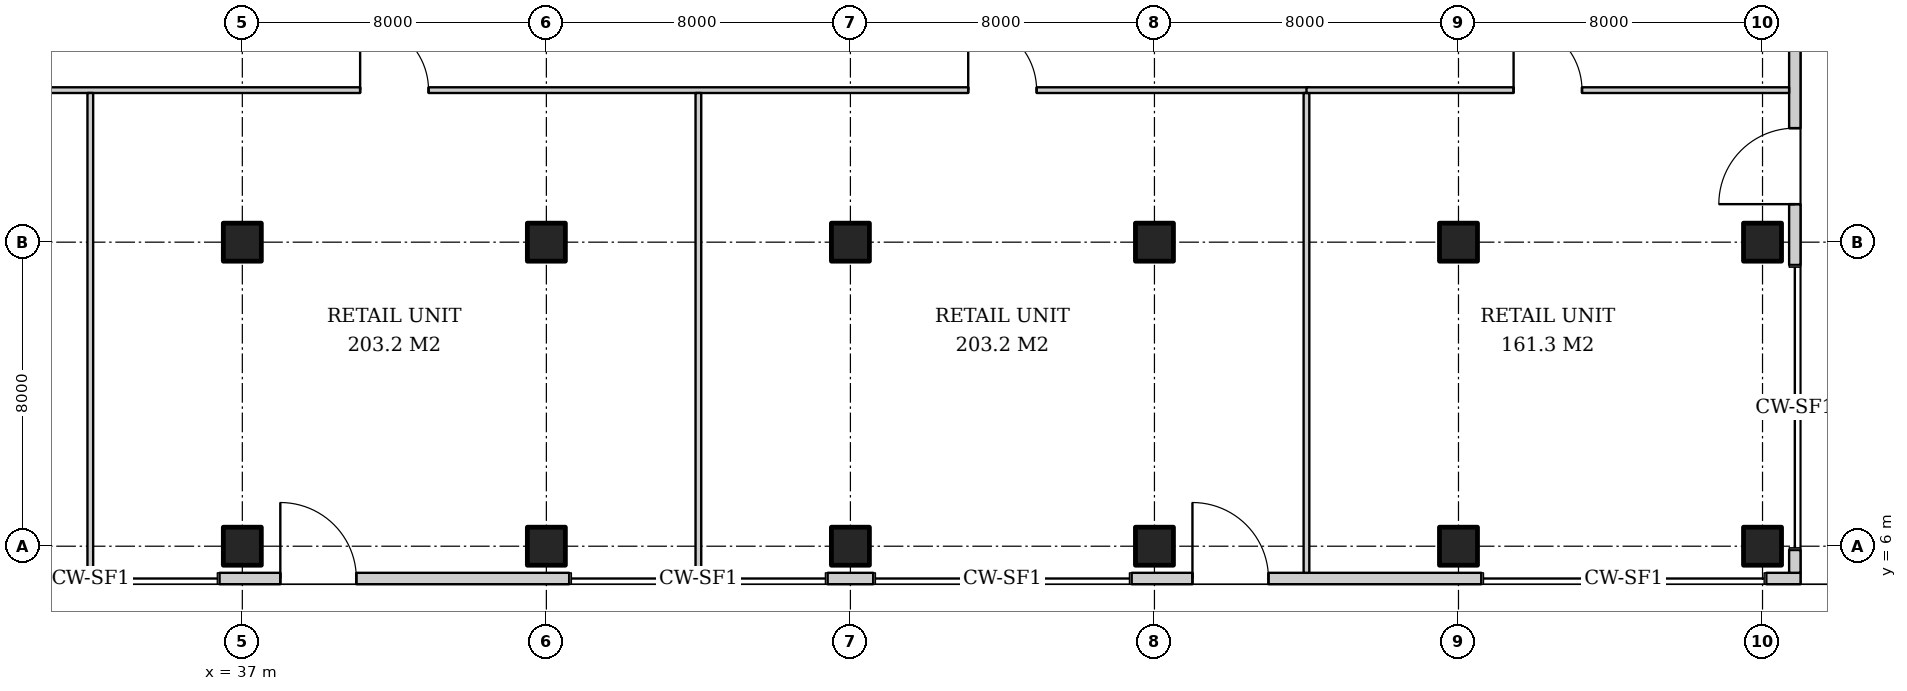
"""IFC4 building model, lengths in metres.
Left out: names, types, materials, properties, quantities, classifications, styles, units other than length and angle.
Written with IfcOpenShell. Run it as: python <this file> out.ifc"""

import sys

from ifc_helpers import new_model, si_unit, direction, frame, frame_2d, origin, origin_2d, place, context, subcontext, project, spatial, rectangle, extrude, element, fill, save


model = new_model("IFC4")
c1 = context("Model", 3, precision=1e-05, world=origin(), true_north=direction((0.0, 1.0)))
c2 = subcontext(c1, "Body", "Model", "MODEL_VIEW")
j1 = project(units=[si_unit("LENGTHUNIT", "METRE"), si_unit("PLANEANGLEUNIT", "RADIAN")], contexts=[c1])
p1 = place(None, origin())
s1 = spatial("IfcSite", under=j1, at=p1, CompositionType="ELEMENT")
p2 = place(p1, origin())
s2 = spatial("IfcBuilding", under=s1, at=p2, CompositionType="ELEMENT")
p3 = place(p2, origin())
s3 = spatial("IfcBuildingStorey", under=s2, at=p3, CompositionType="ELEMENT", Elevation=0.0)
for number, where, z_axis, x_axis in (
    (1, (37.0, 6.0, 0.0), (0.0, 0.0, 1.0), (1.0, 0.0, 0.0)),
    (2, (37.0, 14.0, 0.0), (0.0, 0.0, 1.0), (1.0, 0.0, 0.0)),
    (3, (45.0, 6.0, 0.0), (0.0, 0.0, 1.0), (1.0, 0.0, 0.0)),
    (4, (45.0, 14.0, 0.0), (0.0, 0.0, 1.0), (1.0, 0.0, 0.0)),
    (5, (53.0, 6.0, 0.0), (0.0, 0.0, 1.0), (1.0, 0.0, 0.0)),
    (6, (53.0, 14.0, 0.0), (0.0, 0.0, 1.0), (1.0, 0.0, 0.0)),
    (7, (61.0, 6.0, 0.0), (0.0, 0.0, 1.0), (1.0, 0.0, 0.0)),
    (8, (61.0, 14.0, 0.0), (0.0, 0.0, 1.0), (1.0, 0.0, 0.0)),
    (9, (69.0, 6.0, 0.0), (0.0, 0.0, 1.0), (1.0, 0.0, 0.0)),
    (10, (69.0, 14.0, 0.0), (0.0, 0.0, 1.0), (1.0, 0.0, 0.0)),
    (11, (77.0, 6.0, 0.0), (0.0, 0.0, 1.0), (1.0, 0.0, 0.0)),
    (12, (77.0, 14.0, 0.0), (0.0, 0.0, 1.0), (1.0, 0.0, 0.0)),
):
    element("IfcColumn", number, at=place(p3, frame(where, z_axis=z_axis, x_axis=x_axis)), inside=s3, PredefinedType="COLUMN", context=c2, shape_type="SweptSolid", body=[
        extrude(rectangle(XDim=1.0, YDim=1.0, at=origin_2d()), origin(), (0.0, 0.0, 1.0), 6.0),
    ])
p4 = place(p3, frame((36.4, 5.15, 0.0), z_axis=(0.0, 0.0, 1.0), x_axis=(1.0, 0.0, 0.0)))
e13 = element("IfcWall", 13, at=p4, inside=s3, PredefinedType="SOLIDWALL", context=c2, shape_type="SweptSolid", body=[
    extrude(rectangle(XDim=9.2, YDim=0.3, at=frame_2d((4.6, 0.0))), origin(), (0.0, 0.0, 1.0), 5.7),
])
p5 = place(p4, frame((1.6, 0.0, 0.0)))
e14 = element("IfcOpeningElement", 14, at=p5, cuts=e13, PredefinedType="OPENING", context=c2, shape_type="SweptSolid", body=[
    extrude(rectangle(XDim=2.0, YDim=2.7, at=frame_2d((1.0, 1.35))), frame((0.0, 0.16, 0.0), z_axis=(0.0, -1.0, 0.0), x_axis=(1.0, 0.0, 0.0)), (0.0, 0.0, 1.0), 0.32),
])
p6 = place(p3, frame((52.4, 5.15, 0.0), z_axis=(0.0, 0.0, 1.0), x_axis=(1.0, 0.0, 0.0)))
e15 = element("IfcWall", 15, at=p6, inside=s3, PredefinedType="SOLIDWALL", context=c2, shape_type="SweptSolid", body=[
    extrude(rectangle(XDim=1.2, YDim=0.3, at=frame_2d((0.6, 0.0))), origin(), (0.0, 0.0, 1.0), 5.7),
])
p7 = place(p3, frame((60.4, 5.15, 0.0), z_axis=(0.0, 0.0, 1.0), x_axis=(1.0, 0.0, 0.0)))
e16 = element("IfcWall", 16, at=p7, inside=s3, PredefinedType="SOLIDWALL", context=c2, shape_type="SweptSolid", body=[
    extrude(rectangle(XDim=9.2, YDim=0.3, at=frame_2d((4.6, 0.0))), origin(), (0.0, 0.0, 1.0), 5.7),
])
p8 = place(p7, frame((1.6, 0.0, 0.0)))
e17 = element("IfcOpeningElement", 17, at=p8, cuts=e16, PredefinedType="OPENING", context=c2, shape_type="SweptSolid", body=[
    extrude(rectangle(XDim=2.0, YDim=2.7, at=frame_2d((1.0, 1.35))), frame((0.0, 0.16, 0.0), z_axis=(0.0, -1.0, 0.0), x_axis=(1.0, 0.0, 0.0)), (0.0, 0.0, 1.0), 0.32),
])
p9 = place(p3, frame((77.1, 5.15, 0.0), z_axis=(0.0, 0.0, 1.0), x_axis=(1.0, 0.0, 0.0)))
e18 = element("IfcWall", 18, at=p9, inside=s3, PredefinedType="SOLIDWALL", context=c2, shape_type="SweptSolid", body=[
    extrude(rectangle(XDim=0.9, YDim=0.3, at=frame_2d((0.45, 0.0))), origin(), (0.0, 0.0, 1.0), 5.7),
])
p10 = place(p3, frame((77.85, 5.3, 0.0), z_axis=(0.0, 0.0, 1.0), x_axis=(0.0, 1.0, 0.0)))
e19 = element("IfcWall", 19, at=p10, inside=s3, PredefinedType="SOLIDWALL", context=c2, shape_type="SweptSolid", body=[
    extrude(rectangle(XDim=0.6, YDim=0.3, at=frame_2d((0.3, 0.0))), origin(), (0.0, 0.0, 1.0), 5.7),
])
p11 = place(p3, frame((77.85, 13.4, 0.0), z_axis=(0.0, 0.0, 1.0), x_axis=(0.0, 1.0, 0.0)))
e20 = element("IfcWall", 20, at=p11, inside=s3, PredefinedType="SOLIDWALL", context=c2, shape_type="SweptSolid", body=[
    extrude(rectangle(XDim=17.2, YDim=0.3, at=frame_2d((8.6, 0.0))), origin(), (0.0, 0.0, 1.0), 5.7),
])
p12 = place(p11, frame((1.6, 0.0, 0.0)))
e21 = element("IfcOpeningElement", 21, at=p12, cuts=e20, PredefinedType="OPENING", context=c2, shape_type="SweptSolid", body=[
    extrude(rectangle(XDim=2.0, YDim=2.7, at=frame_2d((1.0, 1.35))), frame((0.0, 0.16, 0.0), z_axis=(0.0, -1.0, 0.0), x_axis=(1.0, 0.0, 0.0)), (0.0, 0.0, 1.0), 0.32),
])
p13 = place(p11, frame((9.6, 0.0, 0.0)))
e22 = element("IfcOpeningElement", 22, at=p13, cuts=e20, PredefinedType="OPENING", context=c2, shape_type="SweptSolid", body=[
    extrude(rectangle(XDim=2.0, YDim=2.7, at=frame_2d((1.0, 1.35))), frame((0.0, 0.16, 0.0), z_axis=(0.0, -1.0, 0.0), x_axis=(1.0, 0.0, 0.0)), (0.0, 0.0, 1.0), 0.32),
])
p14 = place(p3, frame((4.3, 18.0, 0.0), z_axis=(0.0, 0.0, 1.0), x_axis=(1.0, 0.0, 0.0)))
e23 = element("IfcWall", 23, at=p14, inside=s3, PredefinedType="PARTITIONING", context=c2, shape_type="SweptSolid", body=[
    extrude(rectangle(XDim=60.775, YDim=0.15, at=frame_2d((30.387, 0.0))), origin(), (0.0, 0.0, 1.0), 4.2),
])
p15 = place(p14, frame((5.45, 0.0, 0.0)))
e24 = element("IfcOpeningElement", 24, at=p15, cuts=e23, PredefinedType="OPENING", context=c2, shape_type="SweptSolid", body=[
    extrude(rectangle(XDim=1.8, YDim=2.4, at=frame_2d((0.9, 1.2))), frame((0.0, 0.085, 0.0), z_axis=(0.0, -1.0, 0.0), x_axis=(1.0, 0.0, 0.0)), (0.0, 0.0, 1.0), 0.17),
])
p16 = place(p14, frame((19.8, 0.0, 0.0)))
e25 = element("IfcOpeningElement", 25, at=p16, cuts=e23, PredefinedType="OPENING", context=c2, shape_type="SweptSolid", body=[
    extrude(rectangle(XDim=1.8, YDim=2.4, at=frame_2d((0.9, 1.2))), frame((0.0, 0.085, 0.0), z_axis=(0.0, -1.0, 0.0), x_axis=(1.0, 0.0, 0.0)), (0.0, 0.0, 1.0), 0.17),
])
p17 = place(p14, frame((35.8, 0.0, 0.0)))
e26 = element("IfcOpeningElement", 26, at=p17, cuts=e23, PredefinedType="OPENING", context=c2, shape_type="SweptSolid", body=[
    extrude(rectangle(XDim=1.8, YDim=2.4, at=frame_2d((0.9, 1.2))), frame((0.0, 0.085, 0.0), z_axis=(0.0, -1.0, 0.0), x_axis=(1.0, 0.0, 0.0)), (0.0, 0.0, 1.0), 0.17),
])
p18 = place(p14, frame((51.8, 0.0, 0.0)))
e27 = element("IfcOpeningElement", 27, at=p18, cuts=e23, PredefinedType="OPENING", context=c2, shape_type="SweptSolid", body=[
    extrude(rectangle(XDim=1.8, YDim=2.4, at=frame_2d((0.9, 1.2))), frame((0.0, 0.085, 0.0), z_axis=(0.0, -1.0, 0.0), x_axis=(1.0, 0.0, 0.0)), (0.0, 0.0, 1.0), 0.17),
])
for number, where, z_axis, x_axis in (
    (28, (33.0, 17.925, 0.0), (0.0, 0.0, 1.0), (0.0, -1.0, 0.0)),
    (29, (49.0, 17.925, 0.0), (0.0, 0.0, 1.0), (0.0, -1.0, 0.0)),
    (30, (65.0, 17.925, 0.0), (0.0, 0.0, 1.0), (0.0, -1.0, 0.0)),
):
    element("IfcWall", number, at=place(p3, frame(where, z_axis=z_axis, x_axis=x_axis)), inside=s3, PredefinedType="PARTITIONING", context=c2, shape_type="SweptSolid", body=[
        extrude(rectangle(XDim=12.625, YDim=0.15, at=frame_2d((6.312, 0.0))), origin(), (0.0, 0.0, 1.0), 4.2),
    ])
p19 = place(p3, frame((65.0, 18.0, 0.0), z_axis=(0.0, 0.0, 1.0), x_axis=(1.0, 0.0, 0.0)))
e31 = element("IfcWall", 31, at=p19, inside=s3, PredefinedType="PARTITIONING", context=c2, shape_type="SweptSolid", body=[
    extrude(rectangle(XDim=12.7, YDim=0.15, at=frame_2d((6.35, 0.0))), origin(), (0.0, 0.0, 1.0), 5.7),
])
p20 = place(p19, frame((5.45, 0.0, 0.0)))
e32 = element("IfcOpeningElement", 32, at=p20, cuts=e31, PredefinedType="OPENING", context=c2, shape_type="SweptSolid", body=[
    extrude(rectangle(XDim=1.8, YDim=2.4, at=frame_2d((0.9, 1.2))), frame((0.0, 0.085, 0.0), z_axis=(0.0, -1.0, 0.0), x_axis=(1.0, 0.0, 0.0)), (0.0, 0.0, 1.0), 0.17),
])
p21 = place(p5, origin())
e33 = element("IfcDoor", 33, at=p21, inside=s3, OperationType="DOUBLE_DOOR_SINGLE_SWING", PredefinedType="DOOR", context=c2, shape_type="SweptSolid", body=[
    extrude(rectangle(XDim=2.0, YDim=2.7, at=frame_2d((1.0, 1.35))), frame((0.0, 0.025, 0.0), z_axis=(0.0, -1.0, 0.0), x_axis=(1.0, 0.0, 0.0)), (0.0, 0.0, 1.0), 0.05),
])
fill(e14, e33)
p22 = place(p8, origin())
e34 = element("IfcDoor", 34, at=p22, inside=s3, OperationType="DOUBLE_DOOR_SINGLE_SWING", PredefinedType="DOOR", context=c2, shape_type="SweptSolid", body=[
    extrude(rectangle(XDim=2.0, YDim=2.7, at=frame_2d((1.0, 1.35))), frame((0.0, 0.025, 0.0), z_axis=(0.0, -1.0, 0.0), x_axis=(1.0, 0.0, 0.0)), (0.0, 0.0, 1.0), 0.05),
])
fill(e17, e34)
p23 = place(p12, origin())
e35 = element("IfcDoor", 35, at=p23, inside=s3, OperationType="DOUBLE_DOOR_SINGLE_SWING", PredefinedType="DOOR", context=c2, shape_type="SweptSolid", body=[
    extrude(rectangle(XDim=2.0, YDim=2.7, at=frame_2d((1.0, 1.35))), frame((0.0, 0.025, 0.0), z_axis=(0.0, -1.0, 0.0), x_axis=(1.0, 0.0, 0.0)), (0.0, 0.0, 1.0), 0.05),
])
fill(e21, e35)
p24 = place(p17, origin())
e36 = element("IfcDoor", 36, at=p24, inside=s3, OperationType="DOUBLE_DOOR_SINGLE_SWING", PredefinedType="DOOR", context=c2, shape_type="SweptSolid", body=[
    extrude(rectangle(XDim=1.8, YDim=2.4, at=frame_2d((0.9, 1.2))), frame((0.0, 0.025, 0.0), z_axis=(0.0, -1.0, 0.0), x_axis=(1.0, 0.0, 0.0)), (0.0, 0.0, 1.0), 0.05),
])
fill(e26, e36)
p25 = place(p18, origin())
e37 = element("IfcDoor", 37, at=p25, inside=s3, OperationType="DOUBLE_DOOR_SINGLE_SWING", PredefinedType="DOOR", context=c2, shape_type="SweptSolid", body=[
    extrude(rectangle(XDim=1.8, YDim=2.4, at=frame_2d((0.9, 1.2))), frame((0.0, 0.025, 0.0), z_axis=(0.0, -1.0, 0.0), x_axis=(1.0, 0.0, 0.0)), (0.0, 0.0, 1.0), 0.05),
])
fill(e27, e37)
p26 = place(p20, origin())
e38 = element("IfcDoor", 38, at=p26, inside=s3, OperationType="DOUBLE_DOOR_SINGLE_SWING", PredefinedType="DOOR", context=c2, shape_type="SweptSolid", body=[
    extrude(rectangle(XDim=1.8, YDim=2.4, at=frame_2d((0.9, 1.2))), frame((0.0, 0.025, 0.0), z_axis=(0.0, -1.0, 0.0), x_axis=(1.0, 0.0, 0.0)), (0.0, 0.0, 1.0), 0.05),
])
fill(e32, e38)
save(model, sys.argv[1])
